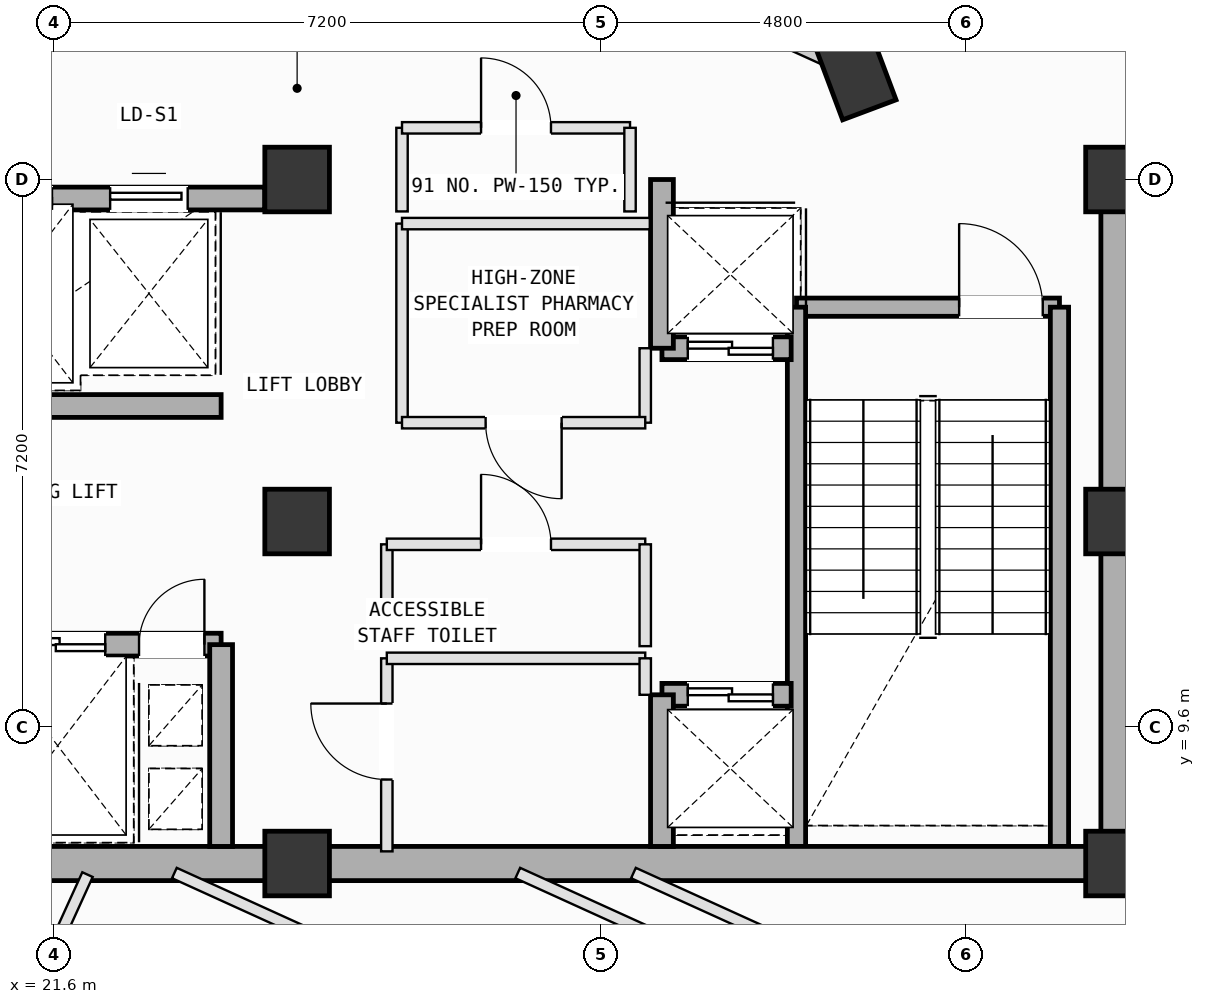
"""IFC4 building model, lengths in metres.
Left out: names, types, materials, properties, quantities, classifications, styles, units other than length and angle.
Written with IfcOpenShell. Run it as: python <this file> out.ifc"""

import sys

from ifc_helpers import new_model, si_unit, direction, frame, frame_2d, origin, origin_2d, place, context, subcontext, project, spatial, rectangle, extrude, element, fill, save


model = new_model("IFC4")
c1 = context("Model", 3, precision=1e-05, world=origin(), true_north=direction((0.0, 1.0)))
c2 = subcontext(c1, "Body", "Model", "MODEL_VIEW")
j1 = project(units=[si_unit("LENGTHUNIT", "METRE"), si_unit("PLANEANGLEUNIT", "RADIAN")], contexts=[c1])
p1 = place(None, origin())
s1 = spatial("IfcSite", under=j1, at=p1, CompositionType="ELEMENT")
p2 = place(p1, origin())
s2 = spatial("IfcBuilding", under=s1, at=p2, CompositionType="ELEMENT")
p3 = place(p2, frame((0.0, 0.0, 304.6)))
s3 = spatial("IfcBuildingStorey", under=s2, at=p3, CompositionType="ELEMENT", Elevation=304.6)
for number, where, z_axis, x_axis in (
    (1, (24.8, 7.8, 0.0), (0.0, 0.0, 1.0), (1.0, 0.0, 0.0)),
    (2, (24.8, 12.3, 0.0), (0.0, 0.0, 1.0), (1.0, 0.0, 0.0)),
    (3, (24.8, 16.8, 0.0), (0.0, 0.0, 1.0), (1.0, 0.0, 0.0)),
    (4, (35.6, 7.8, 0.0), (0.0, 0.0, 1.0), (1.0, 0.0, 0.0)),
    (5, (35.6, 12.3, 0.0), (0.0, 0.0, 1.0), (1.0, 0.0, 0.0)),
    (6, (35.6, 16.8, 0.0), (0.0, 0.0, 1.0), (1.0, 0.0, 0.0)),
):
    element("IfcColumn", number, at=place(p3, frame(where, z_axis=z_axis, x_axis=x_axis)), inside=s3, PredefinedType="COLUMN", context=c2, shape_type="SweptSolid", body=[
        extrude(rectangle(XDim=0.85, YDim=0.85, at=origin_2d()), origin(), (0.0, 0.0, 1.0), 4.0),
    ])
p4 = place(p3, frame((32.118, 18.279, 0.002), z_axis=(0.027064759156, -0.005891648252, 0.999616320041), x_axis=(-0.989252590347, -0.143898000097, 0.02593603784)))
e7 = element("IfcColumn", 7, at=p4, inside=s3, PredefinedType="COLUMN", context=c2, shape_type="SweptSolid", body=[
    extrude(rectangle(XDim=1.2, YDim=0.75, at=origin_2d()), origin(), (0.0, 0.0, 1.0), 3.978),
])
p5 = place(p3, frame((25.471, 21.301, 0.0), z_axis=(0.0, 0.0, 1.0), x_axis=(0.910323213303, -0.413898112247, 0.0)))
e8 = element("IfcWall", 8, at=p5, inside=s3, PredefinedType="SOLIDWALL", context=c2, shape_type="SweptSolid", body=[
    extrude(rectangle(XDim=6.958, YDim=0.28, at=frame_2d((3.479, 0.0))), origin(), (0.0, 0.0, 1.0), 2.765),
])
p6 = place(p3, frame((31.37, 15.12, 0.0), z_axis=(0.0, 0.0, 1.0), x_axis=(1.0, 0.0, 0.0)))
e9 = element("IfcWall", 9, at=p6, inside=s3, PredefinedType="SOLIDWALL", context=c2, shape_type="SweptSolid", body=[
    extrude(rectangle(XDim=3.46, YDim=0.24, at=frame_2d((1.73, 0.0))), origin(), (0.0, 0.0, 1.0), 3.78),
])
p7 = place(p6, frame((2.14, 0.0, 0.0)))
e10 = element("IfcOpeningElement", 10, at=p7, cuts=e9, PredefinedType="OPENING", context=c2, shape_type="SweptSolid", body=[
    extrude(rectangle(XDim=1.1, YDim=2.15, at=frame_2d((0.55, 1.075))), frame((0.0, 0.13, 0.0), z_axis=(0.0, -1.0, 0.0), x_axis=(1.0, 0.0, 0.0)), (0.0, 0.0, 1.0), 0.26),
])
for number, where, z_axis, x_axis in (
    (11, (34.83, 15.12, 0.0), (0.0, 0.0, 1.0), (0.0, -1.0, 0.0)),
    (12, (31.37, 8.025, 0.0), (0.0, 0.0, 1.0), (0.0, 1.0, 0.0)),
):
    element("IfcWall", number, at=place(p3, frame(where, z_axis=z_axis, x_axis=x_axis)), inside=s3, PredefinedType="SOLIDWALL", context=c2, shape_type="SweptSolid", body=[
        extrude(rectangle(XDim=7.095, YDim=0.24, at=frame_2d((3.548, 0.0))), origin(), (0.0, 0.0, 1.0), 3.78),
    ])
for number, where, z_axis, x_axis in (
    (13, (14.0, 7.8, 0.0), (0.0, 0.0, 1.0), (1.0, 0.0, 0.0)),
    (14, (24.8, 7.8, 0.0), (0.0, 0.0, 1.0), (1.0, 0.0, 0.0)),
):
    element("IfcWall", number, at=place(p3, frame(where, z_axis=z_axis, x_axis=x_axis)), inside=s3, PredefinedType="SHEAR", context=c2, shape_type="SweptSolid", body=[
        extrude(rectangle(XDim=10.8, YDim=0.45, at=frame_2d((5.4, 0.0))), origin(), (0.0, 0.0, 1.0), 3.78),
    ])
p8 = place(p3, frame((35.6, 7.8, 0.0), z_axis=(0.0, 0.0, 1.0), x_axis=(0.0, 1.0, 0.0)))
e15 = element("IfcWall", 15, at=p8, inside=s3, PredefinedType="SHEAR", context=c2, shape_type="SweptSolid", body=[
    extrude(rectangle(XDim=9.0, YDim=0.45, at=frame_2d((4.5, 0.0))), origin(), (0.0, 0.0, 1.0), 3.78),
])
p9 = place(p3, frame((19.85, 16.55, 0.0), z_axis=(0.0, 0.0, 1.0), x_axis=(1.0, 0.0, 0.0)))
e16 = element("IfcWall", 16, at=p9, inside=s3, PredefinedType="SOLIDWALL", context=c2, shape_type="SweptSolid", body=[
    extrude(rectangle(XDim=4.525, YDim=0.3, at=frame_2d((2.262, 0.0))), origin(), (0.0, 0.0, 1.0), 3.78),
])
p10 = place(p9, frame((0.475, 0.0, 0.0)))
e17 = element("IfcOpeningElement", 17, at=p10, cuts=e16, PredefinedType="OPENING", context=c2, shape_type="SweptSolid", body=[
    extrude(rectangle(XDim=1.25, YDim=2.18, at=frame_2d((0.625, 1.09))), frame((0.0, 0.16, 0.0), z_axis=(0.0, -1.0, 0.0), x_axis=(1.0, 0.0, 0.0)), (0.0, 0.0, 1.0), 0.32),
])
p11 = place(p9, frame((2.49, 0.0, 0.0)))
e18 = element("IfcOpeningElement", 18, at=p11, cuts=e16, PredefinedType="OPENING", context=c2, shape_type="SweptSolid", body=[
    extrude(rectangle(XDim=1.02, YDim=2.12, at=frame_2d((0.51, 1.06))), frame((0.0, 0.16, 0.0), z_axis=(0.0, -1.0, 0.0), x_axis=(1.0, 0.0, 0.0)), (0.0, 0.0, 1.0), 0.32),
])
p12 = place(p3, frame((18.5, 10.68, 0.0), z_axis=(0.0, 0.0, 1.0), x_axis=(1.0, 0.0, 0.0)))
e19 = element("IfcWall", 19, at=p12, inside=s3, PredefinedType="SOLIDWALL", context=c2, shape_type="SweptSolid", body=[
    extrude(rectangle(XDim=5.3, YDim=0.3, at=frame_2d((2.65, 0.0))), origin(), (0.0, 0.0, 1.0), 3.78),
])
p13 = place(p12, frame((4.22, 0.0, 0.0)))
e20 = element("IfcOpeningElement", 20, at=p13, cuts=e19, PredefinedType="OPENING", context=c2, shape_type="SweptSolid", body=[
    extrude(rectangle(XDim=0.86, YDim=2.06, at=frame_2d((0.43, 1.03))), frame((0.0, 0.16, 0.0), z_axis=(0.0, -1.0, 0.0), x_axis=(1.0, 0.0, 0.0)), (0.0, 0.0, 1.0), 0.32),
])
p14 = place(p12, frame((0.425, 0.0, 0.0)))
e21 = element("IfcOpeningElement", 21, at=p14, cuts=e19, PredefinedType="OPENING", context=c2, shape_type="SweptSolid", body=[
    extrude(rectangle(XDim=1.25, YDim=2.18, at=frame_2d((0.625, 1.09))), frame((0.0, 0.16, 0.0), z_axis=(0.0, -1.0, 0.0), x_axis=(1.0, 0.0, 0.0)), (0.0, 0.0, 1.0), 0.32),
])
p15 = place(p12, frame((2.525, 0.0, 0.0)))
e22 = element("IfcOpeningElement", 22, at=p15, cuts=e19, PredefinedType="OPENING", context=c2, shape_type="SweptSolid", body=[
    extrude(rectangle(XDim=1.25, YDim=2.18, at=frame_2d((0.625, 1.09))), frame((0.0, 0.16, 0.0), z_axis=(0.0, -1.0, 0.0), x_axis=(1.0, 0.0, 0.0)), (0.0, 0.0, 1.0), 0.32),
])
p16 = place(p3, frame((18.5, 13.82, 0.0), z_axis=(0.0, 0.0, 1.0), x_axis=(1.0, 0.0, 0.0)))
e23 = element("IfcWall", 23, at=p16, inside=s3, PredefinedType="SOLIDWALL", context=c2, shape_type="SweptSolid", body=[
    extrude(rectangle(XDim=5.3, YDim=0.3, at=frame_2d((2.65, 0.0))), origin(), (0.0, 0.0, 1.0), 3.78),
])
p17 = place(p16, frame((0.18, 0.0, 0.0)))
e24 = element("IfcOpeningElement", 24, at=p17, cuts=e23, PredefinedType="OPENING", context=c2, shape_type="SweptSolid", body=[
    extrude(rectangle(XDim=1.1, YDim=2.15, at=frame_2d((0.55, 1.075))), frame((0.0, 0.16, 0.0), z_axis=(0.0, -1.0, 0.0), x_axis=(1.0, 0.0, 0.0)), (0.0, 0.0, 1.0), 0.32),
])
p18 = place(p3, frame((23.8, 8.025, 0.0), z_axis=(0.0, 0.0, 1.0), x_axis=(0.0, 1.0, 0.0)))
e25 = element("IfcWall", 25, at=p18, inside=s3, PredefinedType="SOLIDWALL", context=c2, shape_type="SweptSolid", body=[
    extrude(rectangle(XDim=2.655, YDim=0.3, at=frame_2d((1.328, 0.0))), origin(), (0.0, 0.0, 1.0), 3.78),
])
p19 = place(p3, frame((29.6, 10.02, 0.0), z_axis=(0.0, 0.0, 1.0), x_axis=(1.0, 0.0, 0.0)))
e26 = element("IfcWall", 26, at=p19, inside=s3, PredefinedType="SOLIDWALL", context=c2, shape_type="SweptSolid", body=[
    extrude(rectangle(XDim=1.7, YDim=0.3, at=frame_2d((0.85, 0.0))), origin(), (0.0, 0.0, 1.0), 3.78),
])
p20 = place(p19, frame((0.34, 0.0, 0.0)))
e27 = element("IfcOpeningElement", 27, at=p20, cuts=e26, PredefinedType="OPENING", context=c2, shape_type="SweptSolid", body=[
    extrude(rectangle(XDim=1.12, YDim=2.15, at=frame_2d((0.56, 1.075))), frame((0.0, 0.16, 0.0), z_axis=(0.0, -1.0, 0.0), x_axis=(1.0, 0.0, 0.0)), (0.0, 0.0, 1.0), 0.32),
])
p21 = place(p3, frame((29.6, 8.025, 0.0), z_axis=(0.0, 0.0, 1.0), x_axis=(0.0, 1.0, 0.0)))
e28 = element("IfcWall", 28, at=p21, inside=s3, PredefinedType="SOLIDWALL", context=c2, shape_type="SweptSolid", body=[
    extrude(rectangle(XDim=1.995, YDim=0.3, at=frame_2d((0.998, 0.0))), origin(), (0.0, 0.0, 1.0), 3.78),
])
p22 = place(p3, frame((29.6, 14.58, 0.0), z_axis=(0.0, 0.0, 1.0), x_axis=(1.0, 0.0, 0.0)))
e29 = element("IfcWall", 29, at=p22, inside=s3, PredefinedType="SOLIDWALL", context=c2, shape_type="SweptSolid", body=[
    extrude(rectangle(XDim=1.7, YDim=0.3, at=frame_2d((0.85, 0.0))), origin(), (0.0, 0.0, 1.0), 3.78),
])
p23 = place(p22, frame((0.34, 0.0, 0.0)))
e30 = element("IfcOpeningElement", 30, at=p23, cuts=e29, PredefinedType="OPENING", context=c2, shape_type="SweptSolid", body=[
    extrude(rectangle(XDim=1.12, YDim=2.15, at=frame_2d((0.56, 1.075))), frame((0.0, 0.16, 0.0), z_axis=(0.0, -1.0, 0.0), x_axis=(1.0, 0.0, 0.0)), (0.0, 0.0, 1.0), 0.32),
])
p24 = place(p3, frame((29.6, 14.58, 0.0), z_axis=(0.0, 0.0, 1.0), x_axis=(0.0, 1.0, 0.0)))
e31 = element("IfcWall", 31, at=p24, inside=s3, PredefinedType="SOLIDWALL", context=c2, shape_type="SweptSolid", body=[
    extrude(rectangle(XDim=2.22, YDim=0.3, at=frame_2d((1.11, 0.0))), origin(), (0.0, 0.0, 1.0), 3.78),
])
p25 = place(p3, frame((25.98, 7.96, 0.0), z_axis=(0.0, 0.0, 1.0), x_axis=(0.0, 1.0, 0.0)))
e32 = element("IfcWall", 32, at=p25, inside=s3, PredefinedType="PARTITIONING", context=c2, shape_type="SweptSolid", body=[
    extrude(rectangle(XDim=2.54, YDim=0.15, at=frame_2d((1.27, 0.0))), origin(), (0.0, 0.0, 1.0), 3.78),
])
p26 = place(p25, frame((0.945, 0.0, 0.0)))
e33 = element("IfcOpeningElement", 33, at=p26, cuts=e32, PredefinedType="OPENING", context=c2, shape_type="SweptSolid", body=[
    extrude(rectangle(XDim=1.0, YDim=2.12, at=frame_2d((0.5, 1.06))), frame((0.0, 0.085, 0.0), z_axis=(0.0, -1.0, 0.0), x_axis=(1.0, 0.0, 0.0)), (0.0, 0.0, 1.0), 0.17),
])
p27 = place(p3, frame((25.98, 10.5, 0.0), z_axis=(0.0, 0.0, 1.0), x_axis=(1.0, 0.0, 0.0)))
e34 = element("IfcWall", 34, at=p27, inside=s3, PredefinedType="PARTITIONING", context=c2, shape_type="SweptSolid", body=[
    extrude(rectangle(XDim=3.4, YDim=0.15, at=frame_2d((1.7, 0.0))), origin(), (0.0, 0.0, 1.0), 3.78),
])
p28 = place(p3, frame((29.38, 10.5, 0.0), z_axis=(0.0, 0.0, 1.0), x_axis=(0.0, -1.0, 0.0)))
e35 = element("IfcWall", 35, at=p28, inside=s3, PredefinedType="PARTITIONING", context=c2, shape_type="SweptSolid", body=[
    extrude(rectangle(XDim=0.48, YDim=0.15, at=frame_2d((0.24, 0.0))), origin(), (0.0, 0.0, 1.0), 3.78),
])
p29 = place(p3, frame((25.98, 10.66, 0.0), z_axis=(0.0, 0.0, 1.0), x_axis=(0.0, 1.0, 0.0)))
e36 = element("IfcWall", 36, at=p29, inside=s3, PredefinedType="PARTITIONING", context=c2, shape_type="SweptSolid", body=[
    extrude(rectangle(XDim=1.34, YDim=0.15, at=frame_2d((0.67, 0.0))), origin(), (0.0, 0.0, 1.0), 3.78),
])
p30 = place(p3, frame((25.98, 12.0, 0.0), z_axis=(0.0, 0.0, 1.0), x_axis=(1.0, 0.0, 0.0)))
e37 = element("IfcWall", 37, at=p30, inside=s3, PredefinedType="PARTITIONING", context=c2, shape_type="SweptSolid", body=[
    extrude(rectangle(XDim=3.4, YDim=0.15, at=frame_2d((1.7, 0.0))), origin(), (0.0, 0.0, 1.0), 3.78),
])
p31 = place(p30, frame((1.24, 0.0, 0.0)))
e38 = element("IfcOpeningElement", 38, at=p31, cuts=e37, PredefinedType="OPENING", context=c2, shape_type="SweptSolid", body=[
    extrude(rectangle(XDim=0.92, YDim=2.1, at=frame_2d((0.46, 1.05))), frame((0.0, 0.085, 0.0), z_axis=(0.0, -1.0, 0.0), x_axis=(1.0, 0.0, 0.0)), (0.0, 0.0, 1.0), 0.17),
])
p32 = place(p3, frame((29.38, 12.0, 0.0), z_axis=(0.0, 0.0, 1.0), x_axis=(0.0, -1.0, 0.0)))
e39 = element("IfcWall", 39, at=p32, inside=s3, PredefinedType="PARTITIONING", context=c2, shape_type="SweptSolid", body=[
    extrude(rectangle(XDim=1.34, YDim=0.15, at=frame_2d((0.67, 0.0))), origin(), (0.0, 0.0, 1.0), 3.78),
])
p33 = place(p3, frame((26.18, 13.6, 0.0), z_axis=(0.0, 0.0, 1.0), x_axis=(0.0, 1.0, 0.0)))
e40 = element("IfcWall", 40, at=p33, inside=s3, PredefinedType="PARTITIONING", context=c2, shape_type="SweptSolid", body=[
    extrude(rectangle(XDim=2.62, YDim=0.15, at=frame_2d((1.31, 0.0))), origin(), (0.0, 0.0, 1.0), 3.78),
])
p34 = place(p3, frame((26.18, 16.22, 0.0), z_axis=(0.0, 0.0, 1.0), x_axis=(1.0, 0.0, 0.0)))
e41 = element("IfcWall", 41, at=p34, inside=s3, PredefinedType="PARTITIONING", context=c2, shape_type="SweptSolid", body=[
    extrude(rectangle(XDim=3.26, YDim=0.15, at=frame_2d((1.63, 0.0))), origin(), (0.0, 0.0, 1.0), 3.78),
])
p35 = place(p3, frame((29.38, 14.58, 0.0), z_axis=(0.0, 0.0, 1.0), x_axis=(0.0, -1.0, 0.0)))
e42 = element("IfcWall", 42, at=p35, inside=s3, PredefinedType="PARTITIONING", context=c2, shape_type="SweptSolid", body=[
    extrude(rectangle(XDim=0.98, YDim=0.15, at=frame_2d((0.49, 0.0))), origin(), (0.0, 0.0, 1.0), 3.78),
])
p36 = place(p3, frame((29.38, 13.6, 0.0), z_axis=(0.0, 0.0, 1.0), x_axis=(-1.0, 0.0, 0.0)))
e43 = element("IfcWall", 43, at=p36, inside=s3, PredefinedType="PARTITIONING", context=c2, shape_type="SweptSolid", body=[
    extrude(rectangle(XDim=3.2, YDim=0.15, at=frame_2d((1.6, 0.0))), origin(), (0.0, 0.0, 1.0), 3.78),
])
p37 = place(p36, frame((1.1, 0.0, 0.0)))
e44 = element("IfcOpeningElement", 44, at=p37, cuts=e43, PredefinedType="OPENING", context=c2, shape_type="SweptSolid", body=[
    extrude(rectangle(XDim=1.0, YDim=2.12, at=frame_2d((0.5, 1.06))), frame((0.0, 0.085, 0.0), z_axis=(0.0, -1.0, 0.0), x_axis=(1.0, 0.0, 0.0)), (0.0, 0.0, 1.0), 0.17),
])
p38 = place(p3, frame((26.18, 16.38, 0.0), z_axis=(0.0, 0.0, 1.0), x_axis=(0.0, 1.0, 0.0)))
e45 = element("IfcWall", 45, at=p38, inside=s3, PredefinedType="PARTITIONING", context=c2, shape_type="SweptSolid", body=[
    extrude(rectangle(XDim=1.1, YDim=0.15, at=frame_2d((0.55, 0.0))), origin(), (0.0, 0.0, 1.0), 3.78),
])
p39 = place(p3, frame((26.18, 17.48, 0.0), z_axis=(0.0, 0.0, 1.0), x_axis=(1.0, 0.0, 0.0)))
e46 = element("IfcWall", 46, at=p39, inside=s3, PredefinedType="PARTITIONING", context=c2, shape_type="SweptSolid", body=[
    extrude(rectangle(XDim=3.0, YDim=0.15, at=frame_2d((1.5, 0.0))), origin(), (0.0, 0.0, 1.0), 3.78),
])
p40 = place(p39, frame((1.04, 0.0, 0.0)))
e47 = element("IfcOpeningElement", 47, at=p40, cuts=e46, PredefinedType="OPENING", context=c2, shape_type="SweptSolid", body=[
    extrude(rectangle(XDim=0.92, YDim=2.1, at=frame_2d((0.46, 1.05))), frame((0.0, 0.085, 0.0), z_axis=(0.0, -1.0, 0.0), x_axis=(1.0, 0.0, 0.0)), (0.0, 0.0, 1.0), 0.17),
])
p41 = place(p3, frame((29.18, 17.48, 0.0), z_axis=(0.0, 0.0, 1.0), x_axis=(0.0, -1.0, 0.0)))
e48 = element("IfcWall", 48, at=p41, inside=s3, PredefinedType="PARTITIONING", context=c2, shape_type="SweptSolid", body=[
    extrude(rectangle(XDim=1.1, YDim=0.15, at=frame_2d((0.55, 0.0))), origin(), (0.0, 0.0, 1.0), 3.78),
])
p42 = place(p3, frame((19.979, 3.117, 0.0), z_axis=(0.0, 0.0, 1.0), x_axis=(0.413913658196, 0.910316144841, 0.0)))
e49 = element("IfcWall", 49, at=p42, inside=s3, PredefinedType="PARTITIONING", context=c2, shape_type="SweptSolid", body=[
    extrude(rectangle(XDim=4.984, YDim=0.15, at=frame_2d((2.492, 0.0))), origin(), (0.0, 0.0, 1.0), 3.78),
])
p43 = place(p42, frame((1.977, 0.0, 0.0)))
e50 = element("IfcOpeningElement", 50, at=p43, cuts=e49, PredefinedType="OPENING", context=c2, shape_type="SweptSolid", body=[
    extrude(rectangle(XDim=0.86, YDim=2.06, at=frame_2d((0.43, 1.03))), frame((0.0, 0.085, 0.0), z_axis=(0.0, -1.0, 0.0), x_axis=(1.0, 0.0, 0.0)), (0.0, 0.0, 1.0), 0.17),
])
p44 = place(p3, frame((23.185, 7.675, 0.0), z_axis=(0.0, 0.0, 1.0), x_axis=(0.910292616599, -0.413965399721, 0.0)))
e51 = element("IfcWall", 51, at=p44, inside=s3, PredefinedType="PARTITIONING", context=c2, shape_type="SweptSolid", body=[
    extrude(rectangle(XDim=5.208, YDim=0.15, at=frame_2d((2.604, 0.0))), origin(), (0.0, 0.0, 1.0), 3.78),
])
p45 = place(p3, frame((35.774, 4.697, 0.0), z_axis=(0.0, 0.0, 1.0), x_axis=(-0.910299058276, 0.413951234449, 0.0)))
e52 = element("IfcWall", 52, at=p45, inside=s3, PredefinedType="PARTITIONING", context=c2, shape_type="SweptSolid", body=[
    extrude(rectangle(XDim=7.194, YDim=0.15, at=frame_2d((3.597, 0.0))), origin(), (0.0, 0.0, 1.0), 3.78),
])
p46 = place(p3, frame((35.6, 7.5, 0.0), z_axis=(0.0, 0.0, 1.0), x_axis=(1.0, 0.0, 0.0)))
e53 = element("IfcWall", 53, at=p46, inside=s3, PredefinedType="PARTITIONING", context=c2, shape_type="SweptSolid", body=[
    extrude(rectangle(XDim=0.55, YDim=0.15, at=frame_2d((0.275, 0.0))), origin(), (0.0, 0.0, 1.0), 2.765),
])
p47 = place(p3, frame((27.703, 7.675, 0.0), z_axis=(0.0, 0.0, 1.0), x_axis=(0.910320248234, -0.413904633527, 0.0)))
e54 = element("IfcWall", 54, at=p47, inside=s3, PredefinedType="PARTITIONING", context=c2, shape_type="SweptSolid", body=[
    extrude(rectangle(XDim=6.874, YDim=0.15, at=frame_2d((3.437, 0.0))), origin(), (0.0, 0.0, 1.0), 3.78),
])
p48 = place(p7, origin())
e55 = element("IfcDoor", 55, at=p48, inside=s3, OperationType="SINGLE_SWING_LEFT", PredefinedType="DOOR", context=c2, shape_type="SweptSolid", body=[
    extrude(rectangle(XDim=1.1, YDim=2.15, at=frame_2d((0.55, 1.075))), frame((0.0, 0.025, 0.0), z_axis=(0.0, -1.0, 0.0), x_axis=(1.0, 0.0, 0.0)), (0.0, 0.0, 1.0), 0.05),
])
fill(e10, e55)
p49 = place(p13, origin())
e56 = element("IfcDoor", 56, at=p49, inside=s3, OperationType="SINGLE_SWING_RIGHT", PredefinedType="DOOR", context=c2, shape_type="SweptSolid", body=[
    extrude(rectangle(XDim=0.86, YDim=2.06, at=frame_2d((0.43, 1.03))), frame((0.0, 0.025, 0.0), z_axis=(0.0, -1.0, 0.0), x_axis=(1.0, 0.0, 0.0)), (0.0, 0.0, 1.0), 0.05),
])
fill(e20, e56)
p50 = place(p15, origin())
e57 = element("IfcDoor", 57, at=p50, inside=s3, OperationType="DOUBLE_DOOR_SLIDING", PredefinedType="DOOR", context=c2, shape_type="SweptSolid", body=[
    extrude(rectangle(XDim=1.25, YDim=2.18, at=frame_2d((0.625, 1.09))), frame((0.0, 0.025, 0.0), z_axis=(0.0, -1.0, 0.0), x_axis=(1.0, 0.0, 0.0)), (0.0, 0.0, 1.0), 0.05),
])
fill(e22, e57)
p51 = place(p20, origin())
e58 = element("IfcDoor", 58, at=p51, inside=s3, OperationType="DOUBLE_DOOR_SLIDING", PredefinedType="DOOR", context=c2, shape_type="SweptSolid", body=[
    extrude(rectangle(XDim=1.12, YDim=2.15, at=frame_2d((0.56, 1.075))), frame((0.0, 0.025, 0.0), z_axis=(0.0, -1.0, 0.0), x_axis=(1.0, 0.0, 0.0)), (0.0, 0.0, 1.0), 0.05),
])
fill(e27, e58)
p52 = place(p23, origin())
e59 = element("IfcDoor", 59, at=p52, inside=s3, OperationType="DOUBLE_DOOR_SLIDING", PredefinedType="DOOR", context=c2, shape_type="SweptSolid", body=[
    extrude(rectangle(XDim=1.12, YDim=2.15, at=frame_2d((0.56, 1.075))), frame((0.0, 0.025, 0.0), z_axis=(0.0, -1.0, 0.0), x_axis=(1.0, 0.0, 0.0)), (0.0, 0.0, 1.0), 0.05),
])
fill(e30, e59)
p53 = place(p11, origin())
e60 = element("IfcDoor", 60, at=p53, inside=s3, OperationType="SLIDING_TO_LEFT", PredefinedType="DOOR", context=c2, shape_type="SweptSolid", body=[
    extrude(rectangle(XDim=1.02, YDim=2.12, at=frame_2d((0.51, 1.06))), frame((0.0, 0.025, 0.0), z_axis=(0.0, -1.0, 0.0), x_axis=(1.0, 0.0, 0.0)), (0.0, 0.0, 1.0), 0.05),
])
fill(e18, e60)
p54 = place(p26, origin())
e61 = element("IfcDoor", 61, at=p54, inside=s3, OperationType="SINGLE_SWING_RIGHT", PredefinedType="DOOR", context=c2, shape_type="SweptSolid", body=[
    extrude(rectangle(XDim=1.0, YDim=2.12, at=frame_2d((0.5, 1.06))), frame((0.0, 0.025, 0.0), z_axis=(0.0, -1.0, 0.0), x_axis=(1.0, 0.0, 0.0)), (0.0, 0.0, 1.0), 0.05),
])
fill(e33, e61)
p55 = place(p31, origin())
e62 = element("IfcDoor", 62, at=p55, inside=s3, OperationType="SINGLE_SWING_LEFT", PredefinedType="DOOR", context=c2, shape_type="SweptSolid", body=[
    extrude(rectangle(XDim=0.92, YDim=2.1, at=frame_2d((0.46, 1.05))), frame((0.0, 0.025, 0.0), z_axis=(0.0, -1.0, 0.0), x_axis=(1.0, 0.0, 0.0)), (0.0, 0.0, 1.0), 0.05),
])
fill(e38, e62)
p56 = place(p37, origin())
e63 = element("IfcDoor", 63, at=p56, inside=s3, OperationType="SINGLE_SWING_LEFT", PredefinedType="DOOR", context=c2, shape_type="SweptSolid", body=[
    extrude(rectangle(XDim=1.0, YDim=2.12, at=frame_2d((0.5, 1.06))), frame((0.0, 0.025, 0.0), z_axis=(0.0, -1.0, 0.0), x_axis=(1.0, 0.0, 0.0)), (0.0, 0.0, 1.0), 0.05),
])
fill(e44, e63)
p57 = place(p40, origin())
e64 = element("IfcDoor", 64, at=p57, inside=s3, OperationType="SINGLE_SWING_LEFT", PredefinedType="DOOR", context=c2, shape_type="SweptSolid", body=[
    extrude(rectangle(XDim=0.92, YDim=2.1, at=frame_2d((0.46, 1.05))), frame((0.0, 0.025, 0.0), z_axis=(0.0, -1.0, 0.0), x_axis=(1.0, 0.0, 0.0)), (0.0, 0.0, 1.0), 0.05),
])
fill(e47, e64)
save(model, sys.argv[1])
